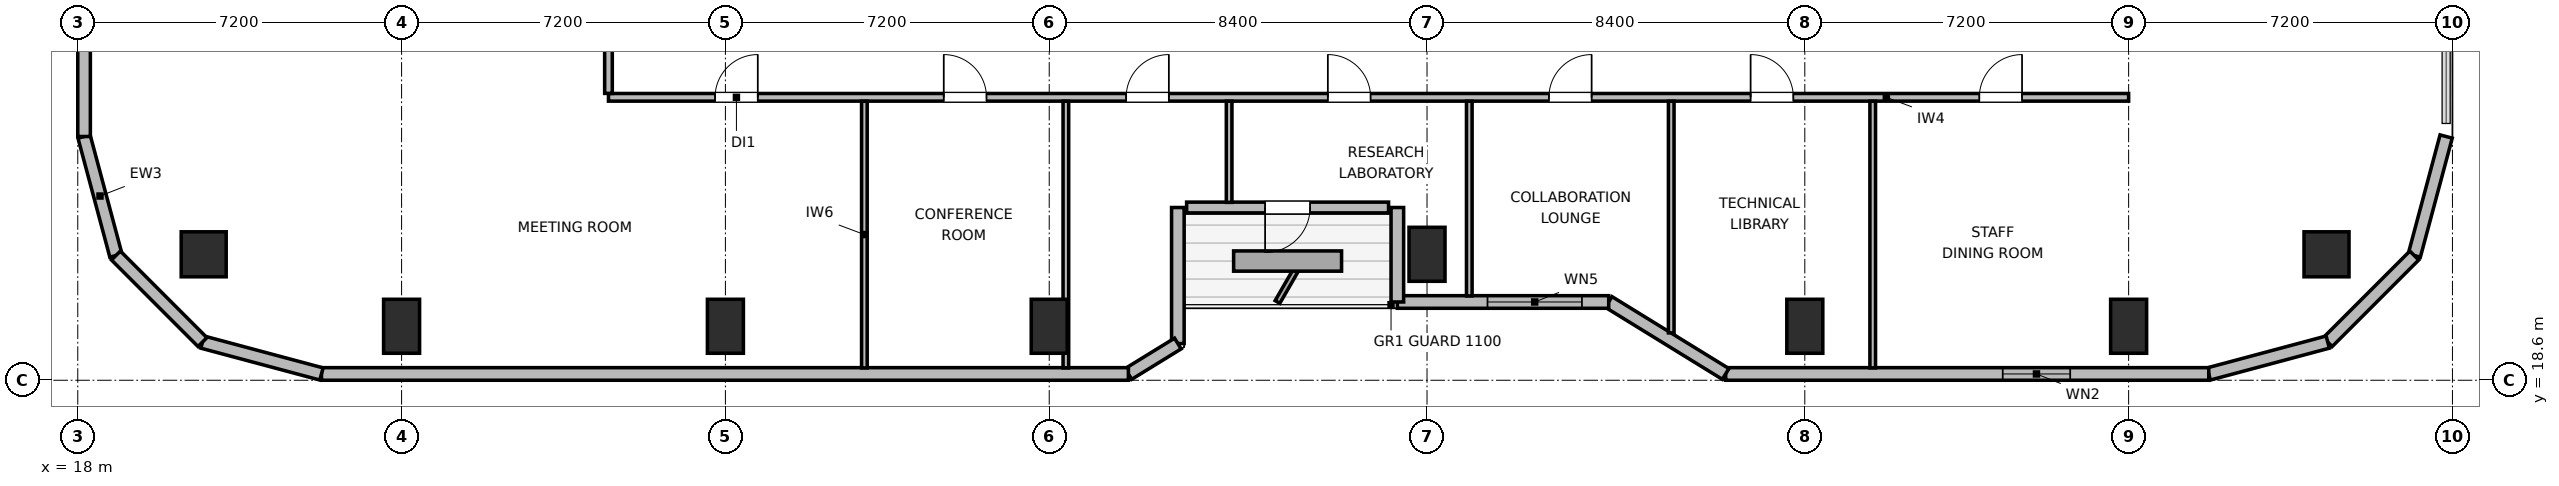
"""IFC4 building model, lengths in metres.
Left out: names, types, materials, properties, quantities, classifications, styles, units other than length and angle.
Written with IfcOpenShell. Run it as: python <this file> out.ifc"""

import sys

from ifc_helpers import new_model, si_unit, direction, frame, frame_2d, origin, origin_2d, place, context, subcontext, project, spatial, rectangle, circle, extrude, element, fill, save


model = new_model("IFC4")
c1 = context("Model", 3, precision=1e-05, world=origin(), true_north=direction((0.0, 1.0)))
c2 = subcontext(c1, "Body", "Model", "MODEL_VIEW")
j1 = project(units=[si_unit("LENGTHUNIT", "METRE"), si_unit("PLANEANGLEUNIT", "RADIAN")], contexts=[c1])
p1 = place(None, origin())
s1 = spatial("IfcSite", under=j1, at=p1, CompositionType="ELEMENT")
p2 = place(p1, origin())
s2 = spatial("IfcBuilding", under=s1, at=p2, CompositionType="ELEMENT")
p3 = place(p2, frame((0.0, 0.0, 162.3)))
s3 = spatial("IfcBuildingStorey", under=s2, at=p3, CompositionType="ELEMENT", Elevation=162.3)
for number, where, z_axis, x_axis in (
    (1, (20.8, 21.4, 0.0), (0.0, 0.0, 1.0), (1.0, 0.0, 0.0)),
    (2, (68.0, 21.4, 0.0), (0.0, 0.0, 1.0), (1.0, 0.0, 0.0)),
):
    element("IfcColumn", number, at=place(p3, frame(where, z_axis=z_axis, x_axis=x_axis)), inside=s3, PredefinedType="COLUMN", context=c2, shape_type="SweptSolid", body=[
        extrude(circle(Radius=0.5, at=origin_2d()), origin(), (0.0, 0.0, 1.0), 3.9),
    ])
for number, where, z_axis, x_axis in (
    (3, (25.2, 19.8, 0.0), (0.0, 0.0, 1.0), (1.0, 0.0, 0.0)),
    (4, (32.4, 19.8, 0.0), (0.0, 0.0, 1.0), (1.0, 0.0, 0.0)),
    (5, (39.6, 19.8, 0.0), (0.0, 0.0, 1.0), (1.0, 0.0, 0.0)),
    (6, (48.0, 21.4, 0.0), (0.0, 0.0, 1.0), (1.0, 0.0, 0.0)),
    (7, (56.4, 19.8, 0.0), (0.0, 0.0, 1.0), (1.0, 0.0, 0.0)),
    (8, (63.6, 19.8, 0.0), (0.0, 0.0, 1.0), (1.0, 0.0, 0.0)),
):
    element("IfcColumn", number, at=place(p3, frame(where, z_axis=z_axis, x_axis=x_axis)), inside=s3, PredefinedType="COLUMN", context=c2, shape_type="SweptSolid", body=[
        extrude(rectangle(XDim=0.8, YDim=1.2, at=origin_2d()), origin(), (0.0, 0.0, 1.0), 3.9),
    ])
p4 = place(p3, frame((18.848, 21.373, 0.0), z_axis=(0.0, 0.0, 1.0), x_axis=(-0.258672222976, 0.9659651552, 0.0)))
e9 = element("IfcWall", 9, at=p4, inside=s3, PredefinedType="SOLIDWALL", context=c2, shape_type="SweptSolid", body=[
    extrude(rectangle(XDim=2.739, YDim=0.28, at=frame_2d((1.37, 0.0))), origin(), (0.0, 0.0, 1.0), 3.68),
])
p5 = place(p3, frame((18.14, 24.018, 0.0), z_axis=(0.0, 0.0, 1.0), x_axis=(0.0, 1.0, 0.0)))
e10 = element("IfcWall", 10, at=p5, inside=s3, PredefinedType="SOLIDWALL", context=c2, shape_type="SweptSolid", body=[
    extrude(rectangle(XDim=5.242, YDim=0.28, at=frame_2d((2.621, 0.0))), origin(), (0.0, 0.0, 1.0), 3.68),
])
p6 = place(p3, frame((70.66, 24.018, 0.0), z_axis=(0.0, 0.0, 1.0), x_axis=(-0.258672222976, -0.9659651552, 0.0)))
e11 = element("IfcWall", 11, at=p6, inside=s3, PredefinedType="SOLIDWALL", context=c2, shape_type="SweptSolid", body=[
    extrude(rectangle(XDim=2.739, YDim=0.28, at=frame_2d((1.37, 0.0))), origin(), (0.0, 0.0, 1.0), 3.68),
])
p7 = place(p3, frame((69.951, 21.373, 0.0), z_axis=(0.0, 0.0, 1.0), x_axis=(-0.707061915429, -0.707151644098, 0.0)))
e12 = element("IfcWall", 12, at=p7, inside=s3, PredefinedType="SOLIDWALL", context=c2, shape_type="SweptSolid", body=[
    extrude(rectangle(XDim=2.721, YDim=0.28, at=frame_2d((1.36, 0.0))), origin(), (0.0, 0.0, 1.0), 3.68),
])
p8 = place(p3, frame((68.028, 19.448, 0.0), z_axis=(0.0, 0.0, 1.0), x_axis=(-0.965971118627, -0.258649952598, 0.0)))
e13 = element("IfcWall", 13, at=p8, inside=s3, PredefinedType="SOLIDWALL", context=c2, shape_type="SweptSolid", body=[
    extrude(rectangle(XDim=2.739, YDim=0.28, at=frame_2d((1.37, 0.0))), origin(), (0.0, 0.0, 1.0), 3.68),
])
p9 = place(p3, frame((65.382, 18.74, 0.0), z_axis=(0.0, 0.0, 1.0), x_axis=(-1.0, 0.0, 0.0)))
e14 = element("IfcWall", 14, at=p9, inside=s3, PredefinedType="SOLIDWALL", context=c2, shape_type="SweptSolid", body=[
    extrude(rectangle(XDim=10.742, YDim=0.28, at=frame_2d((5.371, 0.0))), origin(), (0.0, 0.0, 1.0), 3.68),
])
p10 = place(p9, frame((3.081, 0.0, 0.85)))
e15 = element("IfcOpeningElement", 15, at=p10, cuts=e14, PredefinedType="OPENING", context=c2, shape_type="SweptSolid", body=[
    extrude(rectangle(XDim=1.5, YDim=1.1, at=frame_2d((0.75, 0.55))), frame((0.0, 0.15, 0.0), z_axis=(0.0, -1.0, 0.0), x_axis=(1.0, 0.0, 0.0)), (0.0, 0.0, 1.0), 0.3),
])
p11 = place(p3, frame((54.64, 18.74, 0.0), z_axis=(0.0, 0.0, 1.0), x_axis=(-0.851652825334, 0.524106349037, 0.0)))
e16 = element("IfcWall", 16, at=p11, inside=s3, PredefinedType="SOLIDWALL", context=c2, shape_type="SweptSolid", body=[
    extrude(rectangle(XDim=3.053, YDim=0.28, at=frame_2d((1.526, 0.0))), origin(), (0.0, 0.0, 1.0), 2.265),
])
p12 = place(p3, frame((52.04, 20.34, 0.0), z_axis=(0.0, 0.0, 1.0), x_axis=(-1.0, 0.0, 0.0)))
e17 = element("IfcWall", 17, at=p12, inside=s3, PredefinedType="SOLIDWALL", context=c2, shape_type="SweptSolid", body=[
    extrude(rectangle(XDim=4.699, YDim=0.28, at=frame_2d((2.35, 0.0))), origin(), (0.0, 0.0, 1.0), 2.265),
])
p13 = place(p12, frame((0.595, 0.0, 0.85)))
e18 = element("IfcOpeningElement", 18, at=p13, cuts=e17, PredefinedType="OPENING", context=c2, shape_type="SweptSolid", body=[
    extrude(rectangle(XDim=2.1, YDim=1.05, at=frame_2d((1.05, 0.525))), frame((0.0, 0.15, 0.0), z_axis=(0.0, -1.0, 0.0), x_axis=(1.0, 0.0, 0.0)), (0.0, 0.0, 1.0), 0.3),
])
p14 = place(p3, frame((47.34, 20.34, 0.0), z_axis=(0.0, 0.0, 1.0), x_axis=(0.0, 1.0, 0.0)))
e19 = element("IfcWall", 19, at=p14, inside=s3, PredefinedType="SOLIDWALL", context=c2, shape_type="SweptSolid", body=[
    extrude(rectangle(XDim=2.1, YDim=0.28, at=frame_2d((1.05, 0.0))), origin(), (0.0, 0.0, 1.0), 2.265),
])
p15 = place(p3, frame((47.145, 22.44, 0.0), z_axis=(0.0, 0.0, 1.0), x_axis=(-1.0, 0.0, 0.0)))
e20 = element("IfcWall", 20, at=p15, inside=s3, PredefinedType="SOLIDWALL", context=c2, shape_type="SweptSolid", body=[
    extrude(rectangle(XDim=4.49, YDim=0.24, at=frame_2d((2.245, 0.0))), origin(), (0.0, 0.0, 1.0), 3.68),
])
p16 = place(p15, frame((1.745, 0.0, 0.0)))
e21 = element("IfcOpeningElement", 21, at=p16, cuts=e20, PredefinedType="OPENING", context=c2, shape_type="SweptSolid", body=[
    extrude(rectangle(XDim=1.0, YDim=2.02, at=frame_2d((0.5, 1.01))), frame((0.0, 0.13, 0.0), z_axis=(0.0, -1.0, 0.0), x_axis=(1.0, 0.0, 0.0)), (0.0, 0.0, 1.0), 0.26),
])
p17 = place(p3, frame((42.46, 22.44, 0.0), z_axis=(0.0, 0.0, 1.0), x_axis=(0.0, -1.0, 0.0)))
e22 = element("IfcWall", 22, at=p17, inside=s3, PredefinedType="SOLIDWALL", context=c2, shape_type="SweptSolid", body=[
    extrude(rectangle(XDim=3.024, YDim=0.28, at=frame_2d((1.512, 0.0))), origin(), (0.0, 0.0, 1.0), 2.265),
])
p18 = place(p3, frame((42.46, 19.416, 0.0), z_axis=(0.0, 0.0, 1.0), x_axis=(-0.851801140441, -0.523865266212, 0.0)))
e23 = element("IfcWall", 23, at=p18, inside=s3, PredefinedType="SOLIDWALL", context=c2, shape_type="SweptSolid", body=[
    extrude(rectangle(XDim=1.291, YDim=0.28, at=frame_2d((0.646, 0.0))), origin(), (0.0, 0.0, 1.0), 3.68),
])
p19 = place(p3, frame((41.36, 18.74, 0.0), z_axis=(0.0, 0.0, 1.0), x_axis=(-1.0, 0.0, 0.0)))
e24 = element("IfcWall", 24, at=p19, inside=s3, PredefinedType="SOLIDWALL", context=c2, shape_type="SweptSolid", body=[
    extrude(rectangle(XDim=17.942, YDim=0.28, at=frame_2d((8.971, 0.0))), origin(), (0.0, 0.0, 1.0), 3.68),
])
p20 = place(p3, frame((23.418, 18.74, 0.0), z_axis=(0.0, 0.0, 1.0), x_axis=(-0.965971118627, 0.258649952598, 0.0)))
e25 = element("IfcWall", 25, at=p20, inside=s3, PredefinedType="SOLIDWALL", context=c2, shape_type="SweptSolid", body=[
    extrude(rectangle(XDim=2.739, YDim=0.28, at=frame_2d((1.37, 0.0))), origin(), (0.0, 0.0, 1.0), 3.68),
])
p21 = place(p3, frame((20.772, 19.448, 0.0), z_axis=(0.0, 0.0, 1.0), x_axis=(-0.707106781187, 0.707106781187, 0.0)))
e26 = element("IfcWall", 26, at=p21, inside=s3, PredefinedType="SOLIDWALL", context=c2, shape_type="SweptSolid", body=[
    extrude(rectangle(XDim=2.721, YDim=0.28, at=frame_2d((1.36, 0.0))), origin(), (0.0, 0.0, 1.0), 3.68),
])
p22 = place(p3, frame((29.8, 24.89, 0.0), z_axis=(0.0, 0.0, 1.0), x_axis=(1.0, 0.0, 0.0)))
e27 = element("IfcWall", 27, at=p22, inside=s3, PredefinedType="PARTITIONING", context=c2, shape_type="SweptSolid", body=[
    extrude(rectangle(XDim=33.8, YDim=0.17, at=frame_2d((16.9, 0.0))), origin(), (0.0, 0.0, 1.0), 3.68),
])
p23 = place(p22, frame((2.37, 0.0, 0.0)))
e28 = element("IfcOpeningElement", 28, at=p23, cuts=e27, PredefinedType="OPENING", context=c2, shape_type="SweptSolid", body=[
    extrude(rectangle(XDim=0.95, YDim=2.04, at=frame_2d((0.475, 1.02))), frame((0.0, 0.095, 0.0), z_axis=(0.0, -1.0, 0.0), x_axis=(1.0, 0.0, 0.0)), (0.0, 0.0, 1.0), 0.19),
])
p24 = place(p22, frame((7.455, 0.0, 0.0)))
e29 = element("IfcOpeningElement", 29, at=p24, cuts=e27, PredefinedType="OPENING", context=c2, shape_type="SweptSolid", body=[
    extrude(rectangle(XDim=0.95, YDim=2.04, at=frame_2d((0.475, 1.02))), frame((0.0, 0.095, 0.0), z_axis=(0.0, -1.0, 0.0), x_axis=(1.0, 0.0, 0.0)), (0.0, 0.0, 1.0), 0.19),
])
p25 = place(p22, frame((11.51, 0.0, 0.0)))
e30 = element("IfcOpeningElement", 30, at=p25, cuts=e27, PredefinedType="OPENING", context=c2, shape_type="SweptSolid", body=[
    extrude(rectangle(XDim=0.95, YDim=2.04, at=frame_2d((0.475, 1.02))), frame((0.0, 0.095, 0.0), z_axis=(0.0, -1.0, 0.0), x_axis=(1.0, 0.0, 0.0)), (0.0, 0.0, 1.0), 0.19),
])
p26 = place(p22, frame((15.995, 0.0, 0.0)))
e31 = element("IfcOpeningElement", 31, at=p26, cuts=e27, PredefinedType="OPENING", context=c2, shape_type="SweptSolid", body=[
    extrude(rectangle(XDim=0.95, YDim=2.04, at=frame_2d((0.475, 1.02))), frame((0.0, 0.095, 0.0), z_axis=(0.0, -1.0, 0.0), x_axis=(1.0, 0.0, 0.0)), (0.0, 0.0, 1.0), 0.19),
])
p27 = place(p22, frame((20.91, 0.0, 0.0)))
e32 = element("IfcOpeningElement", 32, at=p27, cuts=e27, PredefinedType="OPENING", context=c2, shape_type="SweptSolid", body=[
    extrude(rectangle(XDim=0.95, YDim=2.04, at=frame_2d((0.475, 1.02))), frame((0.0, 0.095, 0.0), z_axis=(0.0, -1.0, 0.0), x_axis=(1.0, 0.0, 0.0)), (0.0, 0.0, 1.0), 0.19),
])
p28 = place(p22, frame((25.395, 0.0, 0.0)))
e33 = element("IfcOpeningElement", 33, at=p28, cuts=e27, PredefinedType="OPENING", context=c2, shape_type="SweptSolid", body=[
    extrude(rectangle(XDim=0.95, YDim=2.04, at=frame_2d((0.475, 1.02))), frame((0.0, 0.095, 0.0), z_axis=(0.0, -1.0, 0.0), x_axis=(1.0, 0.0, 0.0)), (0.0, 0.0, 1.0), 0.19),
])
p29 = place(p22, frame((30.48, 0.0, 0.0)))
e34 = element("IfcOpeningElement", 34, at=p29, cuts=e27, PredefinedType="OPENING", context=c2, shape_type="SweptSolid", body=[
    extrude(rectangle(XDim=0.95, YDim=2.04, at=frame_2d((0.475, 1.02))), frame((0.0, 0.095, 0.0), z_axis=(0.0, -1.0, 0.0), x_axis=(1.0, 0.0, 0.0)), (0.0, 0.0, 1.0), 0.19),
])
p30 = place(p3, frame((29.8, 24.977, 0.0), z_axis=(0.0, 0.0, 1.0), x_axis=(0.0, 1.0, 0.0)))
e35 = element("IfcWall", 35, at=p30, inside=s3, PredefinedType="PARTITIONING", context=c2, shape_type="SweptSolid", body=[
    extrude(rectangle(XDim=9.423, YDim=0.17, at=frame_2d((4.711, 0.0))), origin(), (0.0, 0.0, 1.0), 3.68),
])
p31 = place(p30, frame((4.193, 0.0, 0.0)))
e36 = element("IfcOpeningElement", 36, at=p31, cuts=e35, PredefinedType="OPENING", context=c2, shape_type="SweptSolid", body=[
    extrude(rectangle(XDim=0.95, YDim=2.04, at=frame_2d((0.475, 1.02))), frame((0.0, 0.095, 0.0), z_axis=(0.0, -1.0, 0.0), x_axis=(1.0, 0.0, 0.0)), (0.0, 0.0, 1.0), 0.19),
])
p32 = place(p3, frame((35.49, 18.875, 0.0), z_axis=(0.0, 0.0, 1.0), x_axis=(0.0, 1.0, 0.0)))
e37 = element("IfcWall", 37, at=p32, inside=s3, PredefinedType="PARTITIONING", context=c2, shape_type="SweptSolid", body=[
    extrude(rectangle(XDim=5.928, YDim=0.125, at=frame_2d((2.964, 0.0))), origin(), (0.0, 0.0, 1.0), 3.68),
])
p33 = place(p3, frame((39.97, 18.875, 0.0), z_axis=(0.0, 0.0, 1.0), x_axis=(0.0, 1.0, 0.0)))
e38 = element("IfcWall", 38, at=p33, inside=s3, PredefinedType="PARTITIONING", context=c2, shape_type="SweptSolid", body=[
    extrude(rectangle(XDim=5.928, YDim=0.125, at=frame_2d((2.964, 0.0))), origin(), (0.0, 0.0, 1.0), 3.043),
])
p34 = place(p3, frame((43.6, 22.555, 0.0), z_axis=(0.0, 0.0, 1.0), x_axis=(0.0, 1.0, 0.0)))
e39 = element("IfcWall", 39, at=p34, inside=s3, PredefinedType="PARTITIONING", context=c2, shape_type="SweptSolid", body=[
    extrude(rectangle(XDim=2.248, YDim=0.125, at=frame_2d((1.124, 0.0))), origin(), (0.0, 0.0, 1.0), 3.043),
])
p35 = place(p3, frame((48.94, 20.475, 0.0), z_axis=(0.0, 0.0, 1.0), x_axis=(0.0, 1.0, 0.0)))
e40 = element("IfcWall", 40, at=p35, inside=s3, PredefinedType="PARTITIONING", context=c2, shape_type="SweptSolid", body=[
    extrude(rectangle(XDim=4.328, YDim=0.125, at=frame_2d((2.164, 0.0))), origin(), (0.0, 0.0, 1.0), 3.68),
])
p36 = place(p3, frame((53.43, 19.653, 0.0), z_axis=(0.0, 0.0, 1.0), x_axis=(0.0, 1.0, 0.0)))
e41 = element("IfcWall", 41, at=p36, inside=s3, PredefinedType="PARTITIONING", context=c2, shape_type="SweptSolid", body=[
    extrude(rectangle(XDim=5.15, YDim=0.125, at=frame_2d((2.575, 0.0))), origin(), (0.0, 0.0, 1.0), 3.043),
])
p37 = place(p3, frame((57.91, 18.875, 0.0), z_axis=(0.0, 0.0, 1.0), x_axis=(0.0, 1.0, 0.0)))
e42 = element("IfcWall", 42, at=p37, inside=s3, PredefinedType="PARTITIONING", context=c2, shape_type="SweptSolid", body=[
    extrude(rectangle(XDim=5.928, YDim=0.125, at=frame_2d((2.964, 0.0))), origin(), (0.0, 0.0, 1.0), 3.68),
])
p38 = place(p10, origin())
e43 = element("IfcWindow", 43, at=p38, inside=s3, PartitioningType="SINGLE_PANEL", PredefinedType="WINDOW", context=c2, shape_type="SweptSolid", body=[
    extrude(rectangle(XDim=1.5, YDim=1.1, at=frame_2d((0.75, 0.55))), frame((0.0, 0.03, 0.0), z_axis=(0.0, -1.0, 0.0), x_axis=(1.0, 0.0, 0.0)), (0.0, 0.0, 1.0), 0.06),
])
fill(e15, e43)
p39 = place(p13, origin())
e44 = element("IfcWindow", 44, at=p39, inside=s3, PartitioningType="SINGLE_PANEL", PredefinedType="WINDOW", context=c2, shape_type="SweptSolid", body=[
    extrude(rectangle(XDim=2.1, YDim=1.05, at=frame_2d((1.05, 0.525))), frame((0.0, 0.03, 0.0), z_axis=(0.0, -1.0, 0.0), x_axis=(1.0, 0.0, 0.0)), (0.0, 0.0, 1.0), 0.06),
])
fill(e18, e44)
p40 = place(p16, origin())
e45 = element("IfcDoor", 45, at=p40, inside=s3, OperationType="SINGLE_SWING_RIGHT", PredefinedType="DOOR", context=c2, shape_type="SweptSolid", body=[
    extrude(rectangle(XDim=1.0, YDim=2.02, at=frame_2d((0.5, 1.01))), frame((0.0, 0.025, 0.0), z_axis=(0.0, -1.0, 0.0), x_axis=(1.0, 0.0, 0.0)), (0.0, 0.0, 1.0), 0.05),
])
fill(e21, e45)
p41 = place(p23, origin())
e46 = element("IfcDoor", 46, at=p41, inside=s3, OperationType="SINGLE_SWING_RIGHT", PredefinedType="DOOR", context=c2, shape_type="SweptSolid", body=[
    extrude(rectangle(XDim=0.95, YDim=2.04, at=frame_2d((0.475, 1.02))), frame((0.0, 0.025, 0.0), z_axis=(0.0, -1.0, 0.0), x_axis=(1.0, 0.0, 0.0)), (0.0, 0.0, 1.0), 0.05),
])
fill(e28, e46)
p42 = place(p24, origin())
e47 = element("IfcDoor", 47, at=p42, inside=s3, OperationType="SINGLE_SWING_LEFT", PredefinedType="DOOR", context=c2, shape_type="SweptSolid", body=[
    extrude(rectangle(XDim=0.95, YDim=2.04, at=frame_2d((0.475, 1.02))), frame((0.0, 0.025, 0.0), z_axis=(0.0, -1.0, 0.0), x_axis=(1.0, 0.0, 0.0)), (0.0, 0.0, 1.0), 0.05),
])
fill(e29, e47)
p43 = place(p25, origin())
e48 = element("IfcDoor", 48, at=p43, inside=s3, OperationType="SINGLE_SWING_RIGHT", PredefinedType="DOOR", context=c2, shape_type="SweptSolid", body=[
    extrude(rectangle(XDim=0.95, YDim=2.04, at=frame_2d((0.475, 1.02))), frame((0.0, 0.025, 0.0), z_axis=(0.0, -1.0, 0.0), x_axis=(1.0, 0.0, 0.0)), (0.0, 0.0, 1.0), 0.05),
])
fill(e30, e48)
p44 = place(p26, origin())
e49 = element("IfcDoor", 49, at=p44, inside=s3, OperationType="SINGLE_SWING_LEFT", PredefinedType="DOOR", context=c2, shape_type="SweptSolid", body=[
    extrude(rectangle(XDim=0.95, YDim=2.04, at=frame_2d((0.475, 1.02))), frame((0.0, 0.025, 0.0), z_axis=(0.0, -1.0, 0.0), x_axis=(1.0, 0.0, 0.0)), (0.0, 0.0, 1.0), 0.05),
])
fill(e31, e49)
p45 = place(p27, origin())
e50 = element("IfcDoor", 50, at=p45, inside=s3, OperationType="SINGLE_SWING_RIGHT", PredefinedType="DOOR", context=c2, shape_type="SweptSolid", body=[
    extrude(rectangle(XDim=0.95, YDim=2.04, at=frame_2d((0.475, 1.02))), frame((0.0, 0.025, 0.0), z_axis=(0.0, -1.0, 0.0), x_axis=(1.0, 0.0, 0.0)), (0.0, 0.0, 1.0), 0.05),
])
fill(e32, e50)
p46 = place(p28, origin())
e51 = element("IfcDoor", 51, at=p46, inside=s3, OperationType="SINGLE_SWING_LEFT", PredefinedType="DOOR", context=c2, shape_type="SweptSolid", body=[
    extrude(rectangle(XDim=0.95, YDim=2.04, at=frame_2d((0.475, 1.02))), frame((0.0, 0.025, 0.0), z_axis=(0.0, -1.0, 0.0), x_axis=(1.0, 0.0, 0.0)), (0.0, 0.0, 1.0), 0.05),
])
fill(e33, e51)
p47 = place(p29, origin())
e52 = element("IfcDoor", 52, at=p47, inside=s3, OperationType="SINGLE_SWING_RIGHT", PredefinedType="DOOR", context=c2, shape_type="SweptSolid", body=[
    extrude(rectangle(XDim=0.95, YDim=2.04, at=frame_2d((0.475, 1.02))), frame((0.0, 0.025, 0.0), z_axis=(0.0, -1.0, 0.0), x_axis=(1.0, 0.0, 0.0)), (0.0, 0.0, 1.0), 0.05),
])
fill(e34, e52)
save(model, sys.argv[1])
